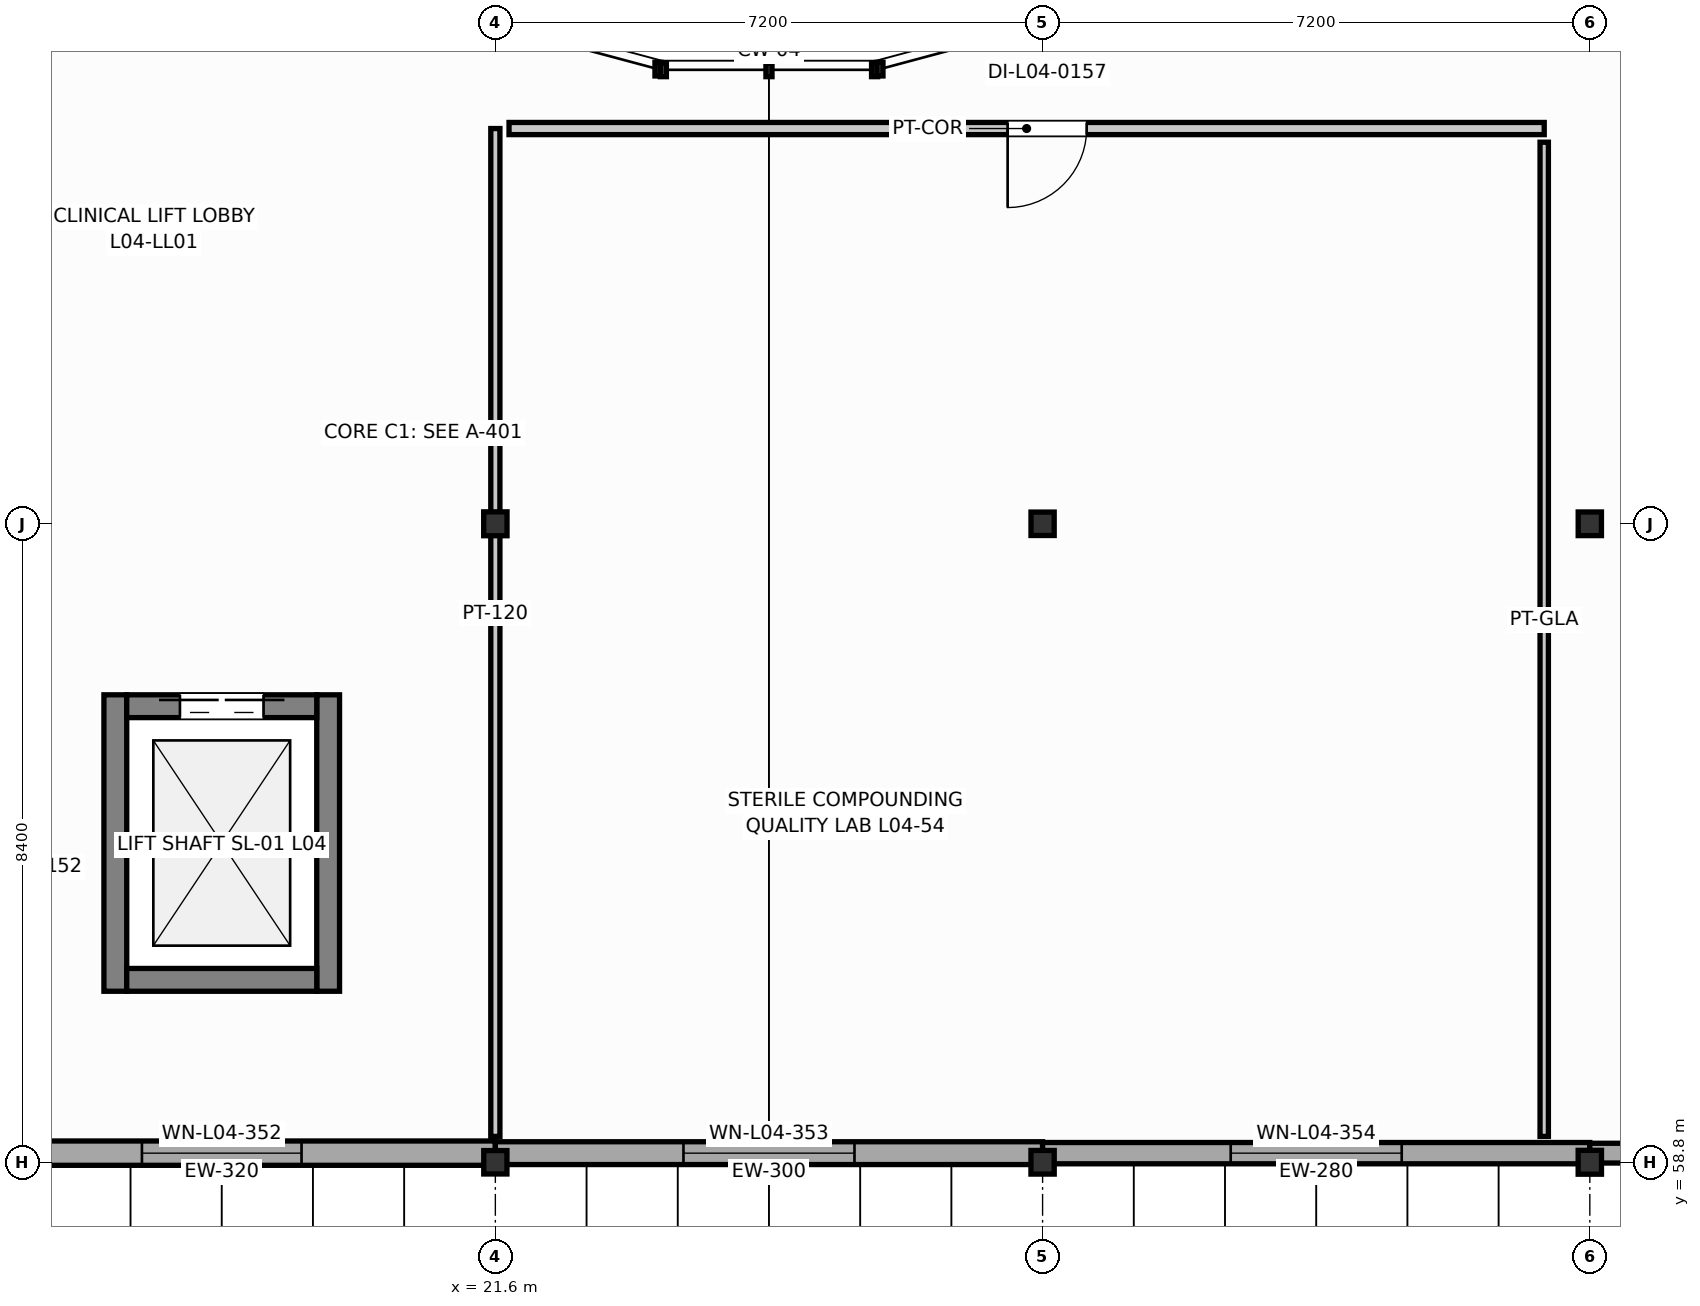
"""IFC4 building model, lengths in metres.
Left out: names, types, materials, properties, quantities, classifications, styles, units other than length and angle.
Written with IfcOpenShell. Run it as: python <this file> out.ifc"""

import sys

from ifc_helpers import new_model, si_unit, direction, frame, frame_2d, origin, origin_2d, place, context, subcontext, project, spatial, rectangle, i_section, extrude, element, fill, save


model = new_model("IFC4")
c1 = context("Model", 3, precision=1e-05, world=origin(), true_north=direction((0.0, 1.0)))
c2 = subcontext(c1, "Body", "Model", "MODEL_VIEW")
j1 = project(units=[si_unit("LENGTHUNIT", "METRE"), si_unit("PLANEANGLEUNIT", "RADIAN")], contexts=[c1])
p1 = place(None, origin())
s1 = spatial("IfcSite", under=j1, at=p1, CompositionType="ELEMENT")
p2 = place(p1, origin())
s2 = spatial("IfcBuilding", under=s1, at=p2, CompositionType="ELEMENT")
p3 = place(p2, frame((0.0, 0.0, 17.4)))
s3 = spatial("IfcBuildingStorey", under=s2, at=p3, CompositionType="ELEMENT", Elevation=17.4)
p4 = place(p3, frame((21.6, 58.8, 0.0), z_axis=(0.0, 0.0, 1.0), x_axis=(1.0, 0.0, 0.0)))
e1 = element("IfcColumn", 1, at=p4, inside=s3, PredefinedType="COLUMN", context=c2, shape_type="SweptSolid", body=[
    extrude(i_section(OverallWidth=0.305, OverallDepth=0.308, WebThickness=0.01, FlangeThickness=0.015, FilletRadius=0.015, at=origin_2d()), origin(), (0.0, 0.0, 1.0), 4.2),
])
p5 = place(p3, frame((21.6, 67.2, 0.0), z_axis=(0.0, 0.0, 1.0), x_axis=(1.0, 0.0, 0.0)))
e2 = element("IfcColumn", 2, at=p5, inside=s3, PredefinedType="COLUMN", context=c2, shape_type="SweptSolid", body=[
    extrude(i_section(OverallWidth=0.307, OverallDepth=0.314, WebThickness=0.012, FlangeThickness=0.019, FilletRadius=0.016, at=origin_2d()), origin(), (0.0, 0.0, 1.0), 4.2),
])
p6 = place(p3, frame((28.8, 58.8, 0.0), z_axis=(0.0, 0.0, 1.0), x_axis=(1.0, 0.0, 0.0)))
e3 = element("IfcColumn", 3, at=p6, inside=s3, PredefinedType="COLUMN", context=c2, shape_type="SweptSolid", body=[
    extrude(i_section(OverallWidth=0.306, OverallDepth=0.311, WebThickness=0.011, FlangeThickness=0.017, FilletRadius=0.015, at=origin_2d()), origin(), (0.0, 0.0, 1.0), 4.2),
])
p7 = place(p3, frame((28.8, 67.2, 0.0), z_axis=(0.0, 0.0, 1.0), x_axis=(1.0, 0.0, 0.0)))
e4 = element("IfcColumn", 4, at=p7, inside=s3, PredefinedType="COLUMN", context=c2, shape_type="SweptSolid", body=[
    extrude(i_section(OverallWidth=0.305, OverallDepth=0.308, WebThickness=0.01, FlangeThickness=0.015, FilletRadius=0.015, at=origin_2d()), origin(), (0.0, 0.0, 1.0), 4.2),
])
p8 = place(p3, frame((36.0, 58.8, 0.0), z_axis=(0.0, 0.0, 1.0), x_axis=(1.0, 0.0, 0.0)))
e5 = element("IfcColumn", 5, at=p8, inside=s3, PredefinedType="COLUMN", context=c2, shape_type="SweptSolid", body=[
    extrude(i_section(OverallWidth=0.307, OverallDepth=0.314, WebThickness=0.012, FlangeThickness=0.019, FilletRadius=0.016, at=origin_2d()), origin(), (0.0, 0.0, 1.0), 4.2),
])
p9 = place(p3, frame((36.0, 67.2, 0.0), z_axis=(0.0, 0.0, 1.0), x_axis=(1.0, 0.0, 0.0)))
e6 = element("IfcColumn", 6, at=p9, inside=s3, PredefinedType="COLUMN", context=c2, shape_type="SweptSolid", body=[
    extrude(i_section(OverallWidth=0.306, OverallDepth=0.311, WebThickness=0.011, FlangeThickness=0.017, FilletRadius=0.015, at=origin_2d()), origin(), (0.0, 0.0, 1.0), 4.2),
])
for number, where, z_axis, x_axis in (
    (7, (16.6, 61.05, 0.0), (0.0, 0.0, 1.0), (0.0, 1.0, 0.0)),
    (8, (19.4, 61.05, 0.0), (0.0, 0.0, 1.0), (0.0, 1.0, 0.0)),
):
    element("IfcWall", number, at=place(p3, frame(where, z_axis=z_axis, x_axis=x_axis)), inside=s3, PredefinedType="SHEAR", context=c2, shape_type="SweptSolid", body=[
        extrude(rectangle(XDim=3.9, YDim=0.3, at=frame_2d((1.95, 0.0))), origin(), (0.0, 0.0, 1.0), 3.99),
    ])
p10 = place(p3, frame((16.75, 64.8, 0.0), z_axis=(0.0, 0.0, 1.0), x_axis=(1.0, 0.0, 0.0)))
e9 = element("IfcWall", 9, at=p10, inside=s3, PredefinedType="SHEAR", context=c2, shape_type="SweptSolid", body=[
    extrude(rectangle(XDim=2.5, YDim=0.3, at=frame_2d((1.25, 0.0))), origin(), (0.0, 0.0, 1.0), 3.99),
])
p11 = place(p10, frame((0.7, 0.0, 0.0)))
e10 = element("IfcOpeningElement", 10, at=p11, cuts=e9, PredefinedType="OPENING", context=c2, shape_type="SweptSolid", body=[
    extrude(rectangle(XDim=1.1, YDim=2.15, at=frame_2d((0.55, 1.075))), frame((0.0, 0.16, 0.0), z_axis=(0.0, -1.0, 0.0), x_axis=(1.0, 0.0, 0.0)), (0.0, 0.0, 1.0), 0.32),
])
p12 = place(p3, frame((16.75, 61.2, 0.0), z_axis=(0.0, 0.0, 1.0), x_axis=(1.0, 0.0, 0.0)))
e11 = element("IfcWall", 11, at=p12, inside=s3, PredefinedType="SHEAR", context=c2, shape_type="SweptSolid", body=[
    extrude(rectangle(XDim=2.5, YDim=0.3, at=frame_2d((1.25, 0.0))), origin(), (0.0, 0.0, 1.0), 3.99),
])
p13 = place(p3, frame((14.4, 58.92, 0.0), z_axis=(0.0, 0.0, 1.0), x_axis=(1.0, 0.0, 0.0)))
e12 = element("IfcWall", 12, at=p13, inside=s3, PredefinedType="SOLIDWALL", context=c2, shape_type="SweptSolid", body=[
    extrude(rectangle(XDim=7.2, YDim=0.32, at=frame_2d((3.6, 0.0))), origin(), (0.0, 0.0, 1.0), 3.482),
])
p14 = place(p13, frame((2.55, 0.0, 0.95)))
e13 = element("IfcOpeningElement", 13, at=p14, cuts=e12, PredefinedType="OPENING", context=c2, shape_type="SweptSolid", body=[
    extrude(rectangle(XDim=2.1, YDim=1.75, at=frame_2d((1.05, 0.875))), frame((0.0, 0.17, 0.0), z_axis=(0.0, -1.0, 0.0), x_axis=(1.0, 0.0, 0.0)), (0.0, 0.0, 1.0), 0.34),
])
p15 = place(p3, frame((21.6, 58.92, 0.0), z_axis=(0.0, 0.0, 1.0), x_axis=(1.0, 0.0, 0.0)))
e14 = element("IfcWall", 14, at=p15, inside=s3, PredefinedType="SOLIDWALL", context=c2, shape_type="SweptSolid", body=[
    extrude(rectangle(XDim=7.2, YDim=0.3, at=frame_2d((3.6, 0.0))), origin(), (0.0, 0.0, 1.0), 3.482),
])
p16 = place(p15, frame((2.475, 0.0, 0.95)))
e15 = element("IfcOpeningElement", 15, at=p16, cuts=e14, PredefinedType="OPENING", context=c2, shape_type="SweptSolid", body=[
    extrude(rectangle(XDim=2.25, YDim=1.15, at=frame_2d((1.125, 0.575))), frame((0.0, 0.16, 0.0), z_axis=(0.0, -1.0, 0.0), x_axis=(1.0, 0.0, 0.0)), (0.0, 0.0, 1.0), 0.32),
])
p17 = place(p3, frame((28.8, 58.92, 0.0), z_axis=(0.0, 0.0, 1.0), x_axis=(1.0, 0.0, 0.0)))
e16 = element("IfcWall", 16, at=p17, inside=s3, PredefinedType="SOLIDWALL", context=c2, shape_type="SweptSolid", body=[
    extrude(rectangle(XDim=7.2, YDim=0.28, at=frame_2d((3.6, 0.0))), origin(), (0.0, 0.0, 1.0), 3.249),
])
p18 = place(p17, frame((2.475, 0.0, 0.95)))
e17 = element("IfcOpeningElement", 17, at=p18, cuts=e16, PredefinedType="OPENING", context=c2, shape_type="SweptSolid", body=[
    extrude(rectangle(XDim=2.25, YDim=1.35, at=frame_2d((1.125, 0.675))), frame((0.0, 0.15, 0.0), z_axis=(0.0, -1.0, 0.0), x_axis=(1.0, 0.0, 0.0)), (0.0, 0.0, 1.0), 0.3),
])
p19 = place(p3, frame((36.0, 58.92, 0.0), z_axis=(0.0, 0.0, 1.0), x_axis=(1.0, 0.0, 0.0)))
e18 = element("IfcWall", 18, at=p19, inside=s3, PredefinedType="SOLIDWALL", context=c2, shape_type="SweptSolid", body=[
    extrude(rectangle(XDim=7.2, YDim=0.26, at=frame_2d((3.6, 0.0))), origin(), (0.0, 0.0, 1.0), 3.249),
])
p20 = place(p19, frame((2.475, 0.0, 0.95)))
e19 = element("IfcOpeningElement", 19, at=p20, cuts=e18, PredefinedType="OPENING", context=c2, shape_type="SweptSolid", body=[
    extrude(rectangle(XDim=2.25, YDim=1.55, at=frame_2d((1.125, 0.775))), frame((0.0, 0.14, 0.0), z_axis=(0.0, -1.0, 0.0), x_axis=(1.0, 0.0, 0.0)), (0.0, 0.0, 1.0), 0.28),
])
p21 = place(p3, frame((21.6, 59.14, 0.0), z_axis=(0.0, 0.0, 1.0), x_axis=(0.0, 1.0, 0.0)))
e20 = element("IfcWall", 20, at=p21, inside=s3, PredefinedType="PARTITIONING", context=c2, shape_type="SweptSolid", body=[
    extrude(rectangle(XDim=13.26, YDim=0.12, at=frame_2d((6.63, 0.0))), origin(), (0.0, 0.0, 1.0), 3.328),
])
p22 = place(p3, frame((21.78, 72.4, 0.0), z_axis=(0.0, 0.0, 1.0), x_axis=(1.0, 0.0, 0.0)))
e21 = element("IfcWall", 21, at=p22, inside=s3, PredefinedType="PARTITIONING", context=c2, shape_type="SweptSolid", body=[
    extrude(rectangle(XDim=13.62, YDim=0.16, at=frame_2d((6.81, 0.0))), origin(), (0.0, 0.0, 1.0), 3.945),
])
p23 = place(p22, frame((6.56, 0.0, 0.0)))
e22 = element("IfcOpeningElement", 22, at=p23, cuts=e21, PredefinedType="OPENING", context=c2, shape_type="SweptSolid", body=[
    extrude(rectangle(XDim=1.04, YDim=2.15, at=frame_2d((0.52, 1.075))), frame((0.0, 0.09, 0.0), z_axis=(0.0, -1.0, 0.0), x_axis=(1.0, 0.0, 0.0)), (0.0, 0.0, 1.0), 0.18),
])
p24 = place(p3, frame((35.4, 72.22, 0.0), z_axis=(0.0, 0.0, 1.0), x_axis=(0.0, -1.0, 0.0)))
e23 = element("IfcWall", 23, at=p24, inside=s3, PredefinedType="MOVABLE", context=c2, shape_type="SweptSolid", body=[
    extrude(rectangle(XDim=13.08, YDim=0.11, at=frame_2d((6.54, 0.0))), origin(), (0.0, 0.0, 1.0), 3.401),
])
p25 = place(p11, origin())
e24 = element("IfcDoor", 24, at=p25, inside=s3, OperationType="DOUBLE_DOOR_SLIDING", PredefinedType="DOOR", context=c2, shape_type="SweptSolid", body=[
    extrude(rectangle(XDim=1.1, YDim=2.15, at=frame_2d((0.55, 1.075))), frame((0.0, 0.025, 0.0), z_axis=(0.0, -1.0, 0.0), x_axis=(1.0, 0.0, 0.0)), (0.0, 0.0, 1.0), 0.05),
])
fill(e10, e24)
p26 = place(p14, origin())
e25 = element("IfcWindow", 25, at=p26, inside=s3, PartitioningType="SINGLE_PANEL", PredefinedType="WINDOW", context=c2, shape_type="SweptSolid", body=[
    extrude(rectangle(XDim=2.1, YDim=1.75, at=frame_2d((1.05, 0.875))), frame((0.0, 0.03, 0.0), z_axis=(0.0, -1.0, 0.0), x_axis=(1.0, 0.0, 0.0)), (0.0, 0.0, 1.0), 0.06),
])
fill(e13, e25)
p27 = place(p16, origin())
e26 = element("IfcWindow", 26, at=p27, inside=s3, PartitioningType="SINGLE_PANEL", PredefinedType="WINDOW", context=c2, shape_type="SweptSolid", body=[
    extrude(rectangle(XDim=2.25, YDim=1.15, at=frame_2d((1.125, 0.575))), frame((0.0, 0.03, 0.0), z_axis=(0.0, -1.0, 0.0), x_axis=(1.0, 0.0, 0.0)), (0.0, 0.0, 1.0), 0.06),
])
fill(e15, e26)
p28 = place(p18, origin())
e27 = element("IfcWindow", 27, at=p28, inside=s3, PartitioningType="SINGLE_PANEL", PredefinedType="WINDOW", context=c2, shape_type="SweptSolid", body=[
    extrude(rectangle(XDim=2.25, YDim=1.35, at=frame_2d((1.125, 0.675))), frame((0.0, 0.03, 0.0), z_axis=(0.0, -1.0, 0.0), x_axis=(1.0, 0.0, 0.0)), (0.0, 0.0, 1.0), 0.06),
])
fill(e17, e27)
p29 = place(p23, frame((1.04, 0.0, 0.0), z_axis=(0.0, 0.0, 1.0), x_axis=(-1.0, 0.0, 0.0)))
e28 = element("IfcDoor", 28, at=p29, inside=s3, OperationType="SINGLE_SWING_RIGHT", PredefinedType="DOOR", context=c2, shape_type="SweptSolid", body=[
    extrude(rectangle(XDim=1.04, YDim=2.15, at=frame_2d((0.52, 1.075))), frame((0.0, 0.025, 0.0), z_axis=(0.0, -1.0, 0.0), x_axis=(1.0, 0.0, 0.0)), (0.0, 0.0, 1.0), 0.05),
])
fill(e22, e28)
save(model, sys.argv[1])
